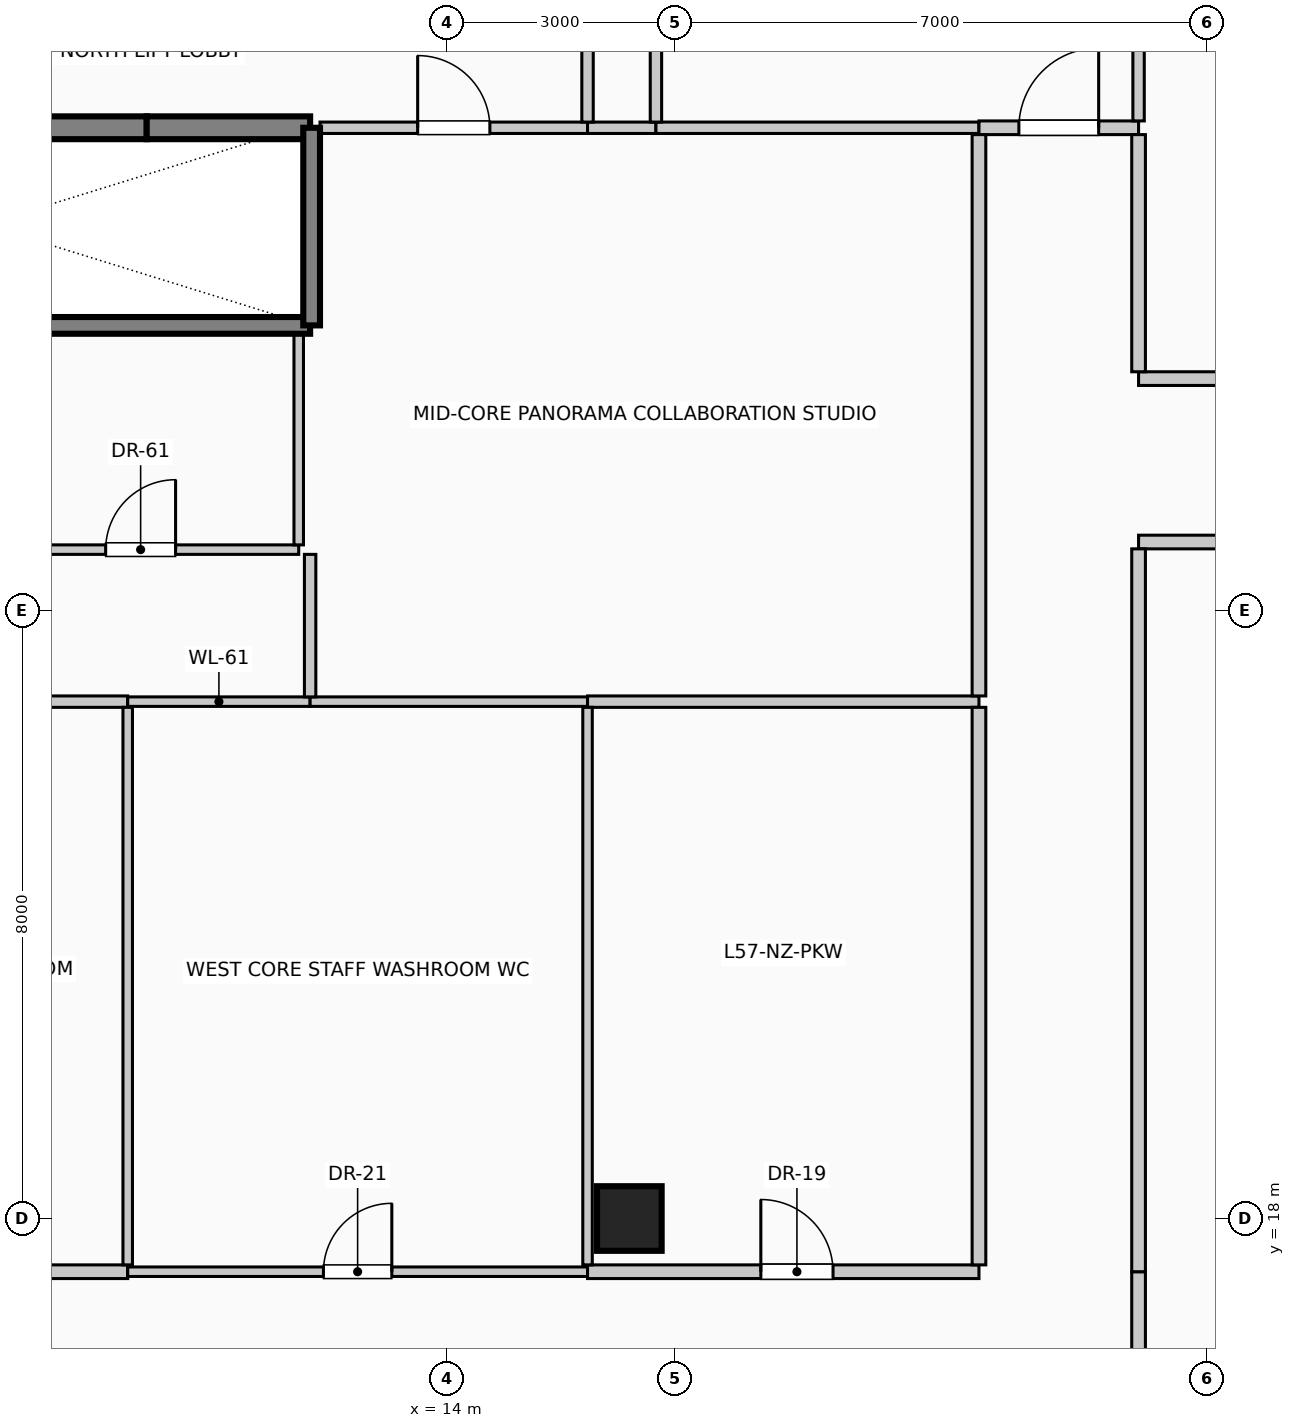
"""IFC4 building model, lengths in metres.
Left out: names, types, materials, properties, quantities, classifications, styles, units other than length and angle.
Written with IfcOpenShell. Run it as: python <this file> out.ifc"""

import sys

from ifc_helpers import new_model, si_unit, direction, frame, frame_2d, origin, origin_2d, place, context, subcontext, project, spatial, rectangle, circle, extrude, element, fill, save


model = new_model("IFC4")
c1 = context("Model", 3, precision=1e-05, world=origin(), true_north=direction((0.0, 1.0)))
c2 = subcontext(c1, "Body", "Model", "MODEL_VIEW")
j1 = project(units=[si_unit("LENGTHUNIT", "METRE"), si_unit("PLANEANGLEUNIT", "RADIAN")], contexts=[c1])
p1 = place(None, origin())
s1 = spatial("IfcSite", under=j1, at=p1, CompositionType="ELEMENT")
p2 = place(p1, origin())
s2 = spatial("IfcBuilding", under=s1, at=p2, CompositionType="ELEMENT")
p3 = place(p2, frame((0.0, 0.0, 234.6)))
s3 = spatial("IfcBuildingStorey", under=s2, at=p3, CompositionType="ELEMENT", Elevation=234.6)
p4 = place(p3, frame((16.4, 18.0, 0.0), z_axis=(0.0, 0.0, 1.0), x_axis=(1.0, 0.0, 0.0)))
e1 = element("IfcColumn", 1, at=p4, inside=s3, PredefinedType="COLUMN", context=c2, shape_type="SweptSolid", body=[
    extrude(circle(Radius=0.425, at=origin_2d()), origin(), (0.0, 0.0, 1.0), 4.0),
])
p5 = place(p3, frame((7.85, 32.35, 0.0), z_axis=(0.0, 0.0, 1.0), x_axis=(1.0, 0.0, 0.0)))
e2 = element("IfcWall", 2, at=p5, inside=s3, PredefinedType="SOLIDWALL", context=c2, shape_type="SweptSolid", body=[
    extrude(rectangle(XDim=2.2, YDim=0.3, at=frame_2d((1.1, 0.0))), origin(), (0.0, 0.0, 1.0), 4.0),
])
p6 = place(p3, frame((10.05, 32.35, 0.0), z_axis=(0.0, 0.0, 1.0), x_axis=(1.0, 0.0, 0.0)))
e3 = element("IfcWall", 3, at=p6, inside=s3, PredefinedType="SOLIDWALL", context=c2, shape_type="SweptSolid", body=[
    extrude(rectangle(XDim=2.15, YDim=0.3, at=frame_2d((1.075, 0.0))), origin(), (0.0, 0.0, 1.0), 4.0),
])
p7 = place(p3, frame((3.55, 29.75, 0.0), z_axis=(0.0, 0.0, 1.0), x_axis=(1.0, 0.0, 0.0)))
e4 = element("IfcWall", 4, at=p7, inside=s3, PredefinedType="SOLIDWALL", context=c2, shape_type="SweptSolid", body=[
    extrude(rectangle(XDim=8.65, YDim=0.22, at=frame_2d((4.325, 0.0))), origin(), (0.0, 0.0, 1.0), 4.0),
])
p8 = place(p3, frame((12.22, 29.75, 0.0), z_axis=(0.0, 0.0, 1.0), x_axis=(0.0, 1.0, 0.0)))
e5 = element("IfcWall", 5, at=p8, inside=s3, PredefinedType="SOLIDWALL", context=c2, shape_type="SweptSolid", body=[
    extrude(rectangle(XDim=2.6, YDim=0.22, at=frame_2d((1.3, 0.0))), origin(), (0.0, 0.0, 1.0), 4.0),
])
p9 = place(p3, frame((3.55, 17.3, 0.0), z_axis=(0.0, 0.0, 1.0), x_axis=(1.0, 0.0, 0.0)))
e6 = element("IfcWall", 6, at=p9, inside=s3, PredefinedType="PARTITIONING", context=c2, shape_type="SweptSolid", body=[
    extrude(rectangle(XDim=6.25, YDim=0.18, at=frame_2d((3.125, 0.0))), origin(), (0.0, 0.0, 1.0), 3.66),
])
p10 = place(p9, frame((2.65, 0.0, 0.0)))
e7 = element("IfcOpeningElement", 7, at=p10, cuts=e6, PredefinedType="OPENING", context=c2, shape_type="SweptSolid", body=[
    extrude(rectangle(XDim=0.95, YDim=2.15, at=frame_2d((0.475, 1.075))), frame((0.0, 0.1, 0.0), z_axis=(0.0, -1.0, 0.0), x_axis=(1.0, 0.0, 0.0)), (0.0, 0.0, 1.0), 0.2),
])
p11 = place(p3, frame((9.8, 17.3, 0.0), z_axis=(0.0, 0.0, 1.0), x_axis=(1.0, 0.0, 0.0)))
e8 = element("IfcWall", 8, at=p11, inside=s3, PredefinedType="PARTITIONING", context=c2, shape_type="SweptSolid", body=[
    extrude(rectangle(XDim=6.05, YDim=0.125, at=frame_2d((3.025, 0.0))), origin(), (0.0, 0.0, 1.0), 3.66),
])
p12 = place(p11, frame((2.575, 0.0, 0.0)))
e9 = element("IfcOpeningElement", 9, at=p12, cuts=e8, PredefinedType="OPENING", context=c2, shape_type="SweptSolid", body=[
    extrude(rectangle(XDim=0.9, YDim=2.1, at=frame_2d((0.45, 1.05))), frame((0.0, 0.073, 0.0), z_axis=(0.0, -1.0, 0.0), x_axis=(1.0, 0.0, 0.0)), (0.0, 0.0, 1.0), 0.145),
])
p13 = place(p3, frame((15.85, 17.3, 0.0), z_axis=(0.0, 0.0, 1.0), x_axis=(1.0, 0.0, 0.0)))
e10 = element("IfcWall", 10, at=p13, inside=s3, PredefinedType="PARTITIONING", context=c2, shape_type="SweptSolid", body=[
    extrude(rectangle(XDim=5.15, YDim=0.18, at=frame_2d((2.575, 0.0))), origin(), (0.0, 0.0, 1.0), 3.66),
])
p14 = place(p13, frame((2.28, 0.0, 0.0)))
e11 = element("IfcOpeningElement", 11, at=p14, cuts=e10, PredefinedType="OPENING", context=c2, shape_type="SweptSolid", body=[
    extrude(rectangle(XDim=0.95, YDim=2.15, at=frame_2d((0.475, 1.075))), frame((0.0, 0.1, 0.0), z_axis=(0.0, -1.0, 0.0), x_axis=(1.0, 0.0, 0.0)), (0.0, 0.0, 1.0), 0.2),
])
p15 = place(p3, frame((3.55, 24.8, 0.0), z_axis=(0.0, 0.0, 1.0), x_axis=(1.0, 0.0, 0.0)))
e12 = element("IfcWall", 12, at=p15, inside=s3, PredefinedType="PARTITIONING", context=c2, shape_type="SweptSolid", body=[
    extrude(rectangle(XDim=6.25, YDim=0.15, at=frame_2d((3.125, 0.0))), origin(), (0.0, 0.0, 1.0), 3.66),
])
p16 = place(p3, frame((9.8, 24.8, 0.0), z_axis=(0.0, 0.0, 1.0), x_axis=(1.0, 0.0, 0.0)))
e13 = element("IfcWall", 13, at=p16, inside=s3, PredefinedType="PARTITIONING", context=c2, shape_type="SweptSolid", body=[
    extrude(rectangle(XDim=2.4, YDim=0.125, at=frame_2d((1.2, 0.0))), origin(), (0.0, 0.0, 1.0), 3.66),
])
p17 = place(p3, frame((12.2, 24.8, 0.0), z_axis=(0.0, 0.0, 1.0), x_axis=(1.0, 0.0, 0.0)))
e14 = element("IfcWall", 14, at=p17, inside=s3, PredefinedType="PARTITIONING", context=c2, shape_type="SweptSolid", body=[
    extrude(rectangle(XDim=3.65, YDim=0.125, at=frame_2d((1.825, 0.0))), origin(), (0.0, 0.0, 1.0), 3.66),
])
p18 = place(p3, frame((15.85, 24.8, 0.0), z_axis=(0.0, 0.0, 1.0), x_axis=(1.0, 0.0, 0.0)))
e15 = element("IfcWall", 15, at=p18, inside=s3, PredefinedType="PARTITIONING", context=c2, shape_type="SweptSolid", body=[
    extrude(rectangle(XDim=5.15, YDim=0.15, at=frame_2d((2.575, 0.0))), origin(), (0.0, 0.0, 1.0), 3.66),
])
p19 = place(p3, frame((7.89, 26.8, 0.0), z_axis=(0.0, 0.0, 1.0), x_axis=(1.0, 0.0, 0.0)))
e16 = element("IfcWall", 16, at=p19, inside=s3, PredefinedType="PARTITIONING", context=c2, shape_type="SweptSolid", body=[
    extrude(rectangle(XDim=4.16, YDim=0.125, at=frame_2d((2.08, 0.0))), origin(), (0.0, 0.0, 1.0), 3.66),
])
p20 = place(p19, frame((1.62, 0.0, 0.0)))
e17 = element("IfcOpeningElement", 17, at=p20, cuts=e16, PredefinedType="OPENING", context=c2, shape_type="SweptSolid", body=[
    extrude(rectangle(XDim=0.92, YDim=2.1, at=frame_2d((0.46, 1.05))), frame((0.0, 0.073, 0.0), z_axis=(0.0, -1.0, 0.0), x_axis=(1.0, 0.0, 0.0)), (0.0, 0.0, 1.0), 0.145),
])
p21 = place(p3, frame((23.1, 26.9, 0.0), z_axis=(0.0, 0.0, 1.0), x_axis=(1.0, 0.0, 0.0)))
e18 = element("IfcWall", 18, at=p21, inside=s3, PredefinedType="PARTITIONING", context=c2, shape_type="SweptSolid", body=[
    extrude(rectangle(XDim=5.67, YDim=0.18, at=frame_2d((2.835, 0.0))), origin(), (0.0, 0.0, 1.0), 3.66),
])
p22 = place(p21, frame((2.36, 0.0, 0.0)))
e19 = element("IfcOpeningElement", 19, at=p22, cuts=e18, PredefinedType="OPENING", context=c2, shape_type="SweptSolid", body=[
    extrude(rectangle(XDim=0.95, YDim=2.15, at=frame_2d((0.475, 1.075))), frame((0.0, 0.1, 0.0), z_axis=(0.0, -1.0, 0.0), x_axis=(1.0, 0.0, 0.0)), (0.0, 0.0, 1.0), 0.2),
])
p23 = place(p3, frame((23.1, 29.05, 0.0), z_axis=(0.0, 0.0, 1.0), x_axis=(1.0, 0.0, 0.0)))
e20 = element("IfcWall", 20, at=p23, inside=s3, PredefinedType="PARTITIONING", context=c2, shape_type="SweptSolid", body=[
    extrude(rectangle(XDim=11.62, YDim=0.18, at=frame_2d((5.81, 0.0))), origin(), (0.0, 0.0, 1.0), 3.66),
])
p24 = place(p23, frame((5.285, 0.0, 0.0)))
e21 = element("IfcOpeningElement", 21, at=p24, cuts=e20, PredefinedType="OPENING", context=c2, shape_type="SweptSolid", body=[
    extrude(rectangle(XDim=1.05, YDim=2.15, at=frame_2d((0.525, 1.075))), frame((0.0, 0.1, 0.0), z_axis=(0.0, -1.0, 0.0), x_axis=(1.0, 0.0, 0.0)), (0.0, 0.0, 1.0), 0.2),
])
p25 = place(p3, frame((12.33, 32.35, 0.0), z_axis=(0.0, 0.0, 1.0), x_axis=(1.0, 0.0, 0.0)))
e22 = element("IfcWall", 22, at=p25, inside=s3, PredefinedType="PARTITIONING", context=c2, shape_type="SweptSolid", body=[
    extrude(rectangle(XDim=3.52, YDim=0.15, at=frame_2d((1.76, 0.0))), origin(), (0.0, 0.0, 1.0), 3.66),
])
p26 = place(p25, frame((1.285, 0.0, 0.0)))
e23 = element("IfcOpeningElement", 23, at=p26, cuts=e22, PredefinedType="OPENING", context=c2, shape_type="SweptSolid", body=[
    extrude(rectangle(XDim=0.95, YDim=2.15, at=frame_2d((0.475, 1.075))), frame((0.0, 0.085, 0.0), z_axis=(0.0, -1.0, 0.0), x_axis=(1.0, 0.0, 0.0)), (0.0, 0.0, 1.0), 0.17),
])
p27 = place(p3, frame((15.85, 32.35, 0.0), z_axis=(0.0, 0.0, 1.0), x_axis=(1.0, 0.0, 0.0)))
e24 = element("IfcWall", 24, at=p27, inside=s3, PredefinedType="PARTITIONING", context=c2, shape_type="SweptSolid", body=[
    extrude(rectangle(XDim=0.9, YDim=0.15, at=frame_2d((0.45, 0.0))), origin(), (0.0, 0.0, 1.0), 3.66),
])
p28 = place(p3, frame((16.75, 32.35, 0.0), z_axis=(0.0, 0.0, 1.0), x_axis=(1.0, 0.0, 0.0)))
e25 = element("IfcWall", 25, at=p28, inside=s3, PredefinedType="PARTITIONING", context=c2, shape_type="SweptSolid", body=[
    extrude(rectangle(XDim=4.25, YDim=0.15, at=frame_2d((2.125, 0.0))), origin(), (0.0, 0.0, 1.0), 3.66),
])
p29 = place(p3, frame((21.0, 32.35, 0.0), z_axis=(0.0, 0.0, 1.0), x_axis=(1.0, 0.0, 0.0)))
e26 = element("IfcWall", 26, at=p29, inside=s3, PredefinedType="PARTITIONING", context=c2, shape_type="SweptSolid", body=[
    extrude(rectangle(XDim=2.1, YDim=0.18, at=frame_2d((1.05, 0.0))), origin(), (0.0, 0.0, 1.0), 3.66),
])
p30 = place(p29, frame((0.525, 0.0, 0.0)))
e27 = element("IfcOpeningElement", 27, at=p30, cuts=e26, PredefinedType="OPENING", context=c2, shape_type="SweptSolid", body=[
    extrude(rectangle(XDim=1.05, YDim=2.15, at=frame_2d((0.525, 1.075))), frame((0.0, 0.1, 0.0), z_axis=(0.0, -1.0, 0.0), x_axis=(1.0, 0.0, 0.0)), (0.0, 0.0, 1.0), 0.2),
])
p31 = place(p3, frame((9.8, 17.39, 0.0), z_axis=(0.0, 0.0, 1.0), x_axis=(0.0, 1.0, 0.0)))
e28 = element("IfcWall", 28, at=p31, inside=s3, PredefinedType="PARTITIONING", context=c2, shape_type="SweptSolid", body=[
    extrude(rectangle(XDim=7.335, YDim=0.125, at=frame_2d((3.667, 0.0))), origin(), (0.0, 0.0, 1.0), 3.66),
])
p32 = place(p3, frame((12.05, 26.863, 0.0), z_axis=(0.0, 0.0, 1.0), x_axis=(0.0, 1.0, 0.0)))
e29 = element("IfcWall", 29, at=p32, inside=s3, PredefinedType="PARTITIONING", context=c2, shape_type="SweptSolid", body=[
    extrude(rectangle(XDim=2.777, YDim=0.125, at=frame_2d((1.389, 0.0))), origin(), (0.0, 0.0, 1.0), 3.66),
])
p33 = place(p3, frame((12.2, 24.863, 0.0), z_axis=(0.0, 0.0, 1.0), x_axis=(0.0, 1.0, 0.0)))
e30 = element("IfcWall", 30, at=p33, inside=s3, PredefinedType="PARTITIONING", context=c2, shape_type="SweptSolid", body=[
    extrude(rectangle(XDim=1.875, YDim=0.15, at=frame_2d((0.938, 0.0))), origin(), (0.0, 0.0, 1.0), 3.66),
])
p34 = place(p3, frame((15.85, 17.39, 0.0), z_axis=(0.0, 0.0, 1.0), x_axis=(0.0, 1.0, 0.0)))
e31 = element("IfcWall", 31, at=p34, inside=s3, PredefinedType="PARTITIONING", context=c2, shape_type="SweptSolid", body=[
    extrude(rectangle(XDim=7.335, YDim=0.125, at=frame_2d((3.667, 0.0))), origin(), (0.0, 0.0, 1.0), 3.66),
])
p35 = place(p3, frame((15.85, 32.425, 0.0), z_axis=(0.0, 0.0, 1.0), x_axis=(0.0, 1.0, 0.0)))
e32 = element("IfcWall", 32, at=p35, inside=s3, PredefinedType="PARTITIONING", context=c2, shape_type="SweptSolid", body=[
    extrude(rectangle(XDim=1.725, YDim=0.15, at=frame_2d((0.862, 0.0))), origin(), (0.0, 0.0, 1.0), 3.66),
])
p36 = place(p3, frame((16.75, 32.425, 0.0), z_axis=(0.0, 0.0, 1.0), x_axis=(0.0, 1.0, 0.0)))
e33 = element("IfcWall", 33, at=p36, inside=s3, PredefinedType="PARTITIONING", context=c2, shape_type="SweptSolid", body=[
    extrude(rectangle(XDim=1.15, YDim=0.15, at=frame_2d((0.575, 0.0))), origin(), (0.0, 0.0, 1.0), 3.66),
])
p37 = place(p3, frame((21.0, 17.39, 0.0), z_axis=(0.0, 0.0, 1.0), x_axis=(0.0, 1.0, 0.0)))
e34 = element("IfcWall", 34, at=p37, inside=s3, PredefinedType="PARTITIONING", context=c2, shape_type="SweptSolid", body=[
    extrude(rectangle(XDim=7.335, YDim=0.18, at=frame_2d((3.667, 0.0))), origin(), (0.0, 0.0, 1.0), 3.66),
])
p38 = place(p3, frame((21.0, 24.875, 0.0), z_axis=(0.0, 0.0, 1.0), x_axis=(0.0, 1.0, 0.0)))
e35 = element("IfcWall", 35, at=p38, inside=s3, PredefinedType="PARTITIONING", context=c2, shape_type="SweptSolid", body=[
    extrude(rectangle(XDim=7.385, YDim=0.18, at=frame_2d((3.692, 0.0))), origin(), (0.0, 0.0, 1.0), 3.66),
])
p39 = place(p3, frame((23.1, 15.29, 0.0), z_axis=(0.0, 0.0, 1.0), x_axis=(0.0, 1.0, 0.0)))
e36 = element("IfcWall", 36, at=p39, inside=s3, PredefinedType="PARTITIONING", context=c2, shape_type="SweptSolid", body=[
    extrude(rectangle(XDim=2.01, YDim=0.18, at=frame_2d((1.005, 0.0))), origin(), (0.0, 0.0, 1.0), 3.66),
])
p40 = place(p3, frame((23.1, 17.3, 0.0), z_axis=(0.0, 0.0, 1.0), x_axis=(0.0, 1.0, 0.0)))
e37 = element("IfcWall", 37, at=p40, inside=s3, PredefinedType="PARTITIONING", context=c2, shape_type="SweptSolid", body=[
    extrude(rectangle(XDim=9.51, YDim=0.18, at=frame_2d((4.755, 0.0))), origin(), (0.0, 0.0, 1.0), 3.66),
])
p41 = place(p3, frame((23.1, 29.14, 0.0), z_axis=(0.0, 0.0, 1.0), x_axis=(0.0, 1.0, 0.0)))
e38 = element("IfcWall", 38, at=p41, inside=s3, PredefinedType="PARTITIONING", context=c2, shape_type="SweptSolid", body=[
    extrude(rectangle(XDim=3.12, YDim=0.18, at=frame_2d((1.56, 0.0))), origin(), (0.0, 0.0, 1.0), 3.66),
])
p42 = place(p3, frame((23.1, 32.44, 0.0), z_axis=(0.0, 0.0, 1.0), x_axis=(0.0, 1.0, 0.0)))
e39 = element("IfcWall", 39, at=p42, inside=s3, PredefinedType="PARTITIONING", context=c2, shape_type="SweptSolid", body=[
    extrude(rectangle(XDim=12.84, YDim=0.15, at=frame_2d((6.42, 0.0))), origin(), (0.0, 0.0, 1.0), 3.66),
])
p43 = place(p12, origin())
e40 = element("IfcDoor", 40, at=p43, inside=s3, OperationType="SINGLE_SWING_RIGHT", PredefinedType="DOOR", context=c2, shape_type="SweptSolid", body=[
    extrude(rectangle(XDim=0.9, YDim=2.1, at=frame_2d((0.45, 1.05))), frame((0.0, 0.025, 0.0), z_axis=(0.0, -1.0, 0.0), x_axis=(1.0, 0.0, 0.0)), (0.0, 0.0, 1.0), 0.05),
])
fill(e9, e40)
p44 = place(p14, origin())
e41 = element("IfcDoor", 41, at=p44, inside=s3, OperationType="SINGLE_SWING_LEFT", PredefinedType="DOOR", context=c2, shape_type="SweptSolid", body=[
    extrude(rectangle(XDim=0.95, YDim=2.15, at=frame_2d((0.475, 1.075))), frame((0.0, 0.025, 0.0), z_axis=(0.0, -1.0, 0.0), x_axis=(1.0, 0.0, 0.0)), (0.0, 0.0, 1.0), 0.05),
])
fill(e11, e41)
p45 = place(p20, origin())
e42 = element("IfcDoor", 42, at=p45, inside=s3, OperationType="SINGLE_SWING_RIGHT", PredefinedType="DOOR", context=c2, shape_type="SweptSolid", body=[
    extrude(rectangle(XDim=0.92, YDim=2.1, at=frame_2d((0.46, 1.05))), frame((0.0, 0.025, 0.0), z_axis=(0.0, -1.0, 0.0), x_axis=(1.0, 0.0, 0.0)), (0.0, 0.0, 1.0), 0.05),
])
fill(e17, e42)
p46 = place(p26, origin())
e43 = element("IfcDoor", 43, at=p46, inside=s3, OperationType="SINGLE_SWING_LEFT", PredefinedType="DOOR", context=c2, shape_type="SweptSolid", body=[
    extrude(rectangle(XDim=0.95, YDim=2.15, at=frame_2d((0.475, 1.075))), frame((0.0, 0.025, 0.0), z_axis=(0.0, -1.0, 0.0), x_axis=(1.0, 0.0, 0.0)), (0.0, 0.0, 1.0), 0.05),
])
fill(e23, e43)
p47 = place(p30, origin())
e44 = element("IfcDoor", 44, at=p47, inside=s3, OperationType="SINGLE_SWING_RIGHT", PredefinedType="DOOR", context=c2, shape_type="SweptSolid", body=[
    extrude(rectangle(XDim=1.05, YDim=2.15, at=frame_2d((0.525, 1.075))), frame((0.0, 0.025, 0.0), z_axis=(0.0, -1.0, 0.0), x_axis=(1.0, 0.0, 0.0)), (0.0, 0.0, 1.0), 0.05),
])
fill(e27, e44)
save(model, sys.argv[1])
